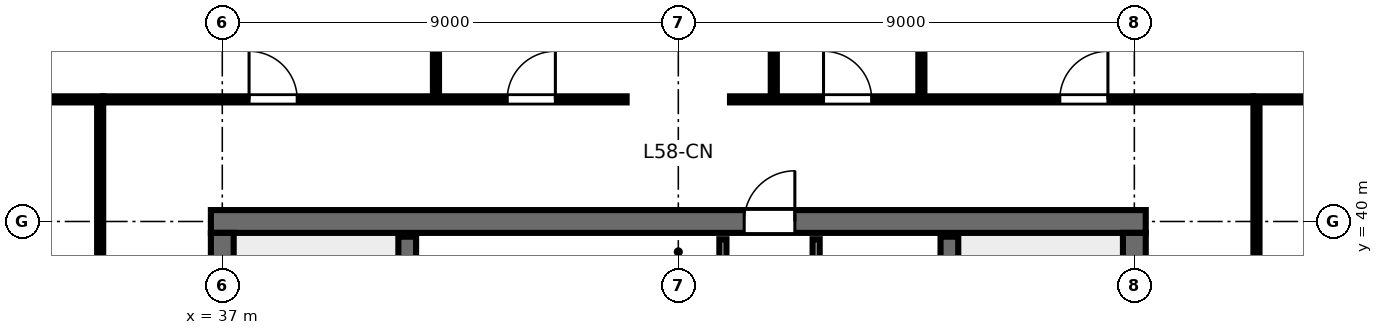
"""IFC4 building model, lengths in metres.
Left out: names, types, materials, properties, quantities, classifications, styles, units other than length and angle.
Written with IfcOpenShell. Run it as: python <this file> out.ifc"""

import sys

from ifc_helpers import new_model, si_unit, direction, frame, frame_2d, origin, place, context, subcontext, project, spatial, rectangle, extrude, element, fill, save


model = new_model("IFC4")
c1 = context("Model", 3, precision=1e-05, world=origin(), true_north=direction((0.0, 1.0)))
c2 = subcontext(c1, "Body", "Model", "MODEL_VIEW")
j1 = project(units=[si_unit("LENGTHUNIT", "METRE"), si_unit("PLANEANGLEUNIT", "RADIAN")], contexts=[c1])
p1 = place(None, origin())
s1 = spatial("IfcSite", under=j1, at=p1, CompositionType="ELEMENT")
p2 = place(p1, origin())
s2 = spatial("IfcBuilding", under=s1, at=p2, CompositionType="ELEMENT")
p3 = place(p2, frame((0.0, 0.0, 220.2)))
s3 = spatial("IfcBuildingStorey", under=s2, at=p3, CompositionType="ELEMENT", Elevation=220.2)
p4 = place(p3, frame((36.775, 40.0, 0.0), z_axis=(0.0, 0.0, 1.0), x_axis=(1.0, 0.0, 0.0)))
e1 = element("IfcWall", 1, at=p4, inside=s3, PredefinedType="SHEAR", context=c2, shape_type="SweptSolid", body=[
    extrude(rectangle(XDim=18.45, YDim=0.45, at=frame_2d((9.225, 0.0))), origin(), (0.0, 0.0, 1.0), 3.36),
])
p5 = place(p4, frame((10.525, 0.0, 0.0)))
e2 = element("IfcOpeningElement", 2, at=p5, cuts=e1, PredefinedType="OPENING", context=c2, shape_type="SweptSolid", body=[
    extrude(rectangle(XDim=1.0, YDim=2.15, at=frame_2d((0.5, 1.075))), frame((0.0, 0.235, 0.0), z_axis=(0.0, -1.0, 0.0), x_axis=(1.0, 0.0, 0.0)), (0.0, 0.0, 1.0), 0.47),
])
p6 = place(p3, frame((37.0, 24.225, 0.0), z_axis=(0.0, 0.0, 1.0), x_axis=(0.0, 1.0, 0.0)))
e3 = element("IfcWall", 3, at=p6, inside=s3, PredefinedType="SHEAR", context=c2, shape_type="SweptSolid", body=[
    extrude(rectangle(XDim=15.55, YDim=0.45, at=frame_2d((7.775, 0.0))), origin(), (0.0, 0.0, 1.0), 3.36),
])
p7 = place(p6, frame((5.3, 0.0, 0.0)))
e4 = element("IfcOpeningElement", 4, at=p7, cuts=e3, PredefinedType="OPENING", context=c2, shape_type="SweptSolid", body=[
    extrude(rectangle(XDim=1.15, YDim=2.15, at=frame_2d((0.575, 1.075))), frame((0.0, 0.235, 0.0), z_axis=(0.0, -1.0, 0.0), x_axis=(1.0, 0.0, 0.0)), (0.0, 0.0, 1.0), 0.47),
])
p8 = place(p3, frame((55.0, 24.225, 0.0), z_axis=(0.0, 0.0, 1.0), x_axis=(0.0, 1.0, 0.0)))
e5 = element("IfcWall", 5, at=p8, inside=s3, PredefinedType="SHEAR", context=c2, shape_type="SweptSolid", body=[
    extrude(rectangle(XDim=15.55, YDim=0.45, at=frame_2d((7.775, 0.0))), origin(), (0.0, 0.0, 1.0), 3.36),
])
p9 = place(p8, frame((5.3, 0.0, 0.0)))
e6 = element("IfcOpeningElement", 6, at=p9, cuts=e5, PredefinedType="OPENING", context=c2, shape_type="SweptSolid", body=[
    extrude(rectangle(XDim=1.15, YDim=2.15, at=frame_2d((0.575, 1.075))), frame((0.0, 0.235, 0.0), z_axis=(0.0, -1.0, 0.0), x_axis=(1.0, 0.0, 0.0)), (0.0, 0.0, 1.0), 0.47),
])
for number, where, z_axis, x_axis in (
    (7, (40.65, 32.0, 0.0), (0.0, 0.0, 1.0), (0.0, 1.0, 0.0)),
    (8, (51.35, 32.0, 0.0), (0.0, 0.0, 1.0), (0.0, 1.0, 0.0)),
):
    element("IfcWall", number, at=place(p3, frame(where, z_axis=z_axis, x_axis=x_axis)), inside=s3, PredefinedType="SHEAR", context=c2, shape_type="SweptSolid", body=[
        extrude(rectangle(XDim=7.7, YDim=0.35, at=frame_2d((3.85, 0.0))), origin(), (0.0, 0.0, 1.0), 3.6),
    ])
p10 = place(p3, frame((46.88, 32.05, 0.0), z_axis=(0.0, 0.0, 1.0), x_axis=(0.0, 1.0, 0.0)))
e9 = element("IfcWall", 9, at=p10, inside=s3, PredefinedType="PARTITIONING", context=c2, shape_type="SweptSolid", body=[
    extrude(rectangle(XDim=7.6, YDim=0.14, at=frame_2d((3.8, 0.0))), origin(), (0.0, 0.0, 1.0), 3.375),
])
p11 = place(p10, frame((3.4, 0.0, 0.0)))
e10 = element("IfcOpeningElement", 10, at=p11, cuts=e9, PredefinedType="OPENING", context=c2, shape_type="SweptSolid", body=[
    extrude(rectangle(XDim=0.95, YDim=2.15, at=frame_2d((0.475, 1.075))), frame((0.0, 0.08, 0.0), z_axis=(0.0, -1.0, 0.0), x_axis=(1.0, 0.0, 0.0)), (0.0, 0.0, 1.0), 0.16),
])
p12 = place(p3, frame((48.72, 32.05, 0.0), z_axis=(0.0, 0.0, 1.0), x_axis=(0.0, 1.0, 0.0)))
e11 = element("IfcWall", 11, at=p12, inside=s3, PredefinedType="PARTITIONING", context=c2, shape_type="SweptSolid", body=[
    extrude(rectangle(XDim=7.6, YDim=0.14, at=frame_2d((3.8, 0.0))), origin(), (0.0, 0.0, 1.0), 3.375),
])
p13 = place(p12, frame((0.8, 0.0, 0.0)))
e12 = element("IfcOpeningElement", 12, at=p13, cuts=e11, PredefinedType="OPENING", context=c2, shape_type="SweptSolid", body=[
    extrude(rectangle(XDim=0.9, YDim=2.15, at=frame_2d((0.45, 1.075))), frame((0.0, 0.08, 0.0), z_axis=(0.0, -1.0, 0.0), x_axis=(1.0, 0.0, 0.0)), (0.0, 0.0, 1.0), 0.16),
])
p14 = place(p12, frame((3.35, 0.0, 0.0)))
e13 = element("IfcOpeningElement", 13, at=p14, cuts=e11, PredefinedType="OPENING", context=c2, shape_type="SweptSolid", body=[
    extrude(rectangle(XDim=0.9, YDim=2.15, at=frame_2d((0.45, 1.075))), frame((0.0, 0.08, 0.0), z_axis=(0.0, -1.0, 0.0), x_axis=(1.0, 0.0, 0.0)), (0.0, 0.0, 1.0), 0.16),
])
p15 = place(p12, frame((5.9, 0.0, 0.0)))
e14 = element("IfcOpeningElement", 14, at=p15, cuts=e11, PredefinedType="OPENING", context=c2, shape_type="SweptSolid", body=[
    extrude(rectangle(XDim=0.92, YDim=2.15, at=frame_2d((0.46, 1.075))), frame((0.0, 0.08, 0.0), z_axis=(0.0, -1.0, 0.0), x_axis=(1.0, 0.0, 0.0)), (0.0, 0.0, 1.0), 0.16),
])
p16 = place(p3, frame((41.217, 42.41, 0.0), z_axis=(0.0, 0.0, 1.0), x_axis=(0.0, 1.0, 0.0)))
e15 = element("IfcWall", 15, at=p16, inside=s3, PredefinedType="PARTITIONING", context=c2, shape_type="SweptSolid", body=[
    extrude(rectangle(XDim=7.137, YDim=0.12, at=frame_2d((3.569, 0.0))), origin(), (0.0, 0.0, 1.0), 2.655),
])
p17 = place(p16, frame((1.4, 0.0, 0.0)))
e16 = element("IfcOpeningElement", 16, at=p17, cuts=e15, PredefinedType="OPENING", context=c2, shape_type="SweptSolid", body=[
    extrude(rectangle(XDim=0.9, YDim=2.15, at=frame_2d((0.45, 1.075))), frame((0.0, 0.07, 0.0), z_axis=(0.0, -1.0, 0.0), x_axis=(1.0, 0.0, 0.0)), (0.0, 0.0, 1.0), 0.14),
])
p18 = place(p3, frame((47.885, 42.41, 0.0), z_axis=(0.0, 0.0, 1.0), x_axis=(0.0, 1.0, 0.0)))
e17 = element("IfcWall", 17, at=p18, inside=s3, PredefinedType="PARTITIONING", context=c2, shape_type="SweptSolid", body=[
    extrude(rectangle(XDim=7.137, YDim=0.12, at=frame_2d((3.569, 0.0))), origin(), (0.0, 0.0, 1.0), 2.655),
])
p19 = place(p18, frame((1.4, 0.0, 0.0)))
e18 = element("IfcOpeningElement", 18, at=p19, cuts=e17, PredefinedType="OPENING", context=c2, shape_type="SweptSolid", body=[
    extrude(rectangle(XDim=0.9, YDim=2.15, at=frame_2d((0.45, 1.075))), frame((0.0, 0.07, 0.0), z_axis=(0.0, -1.0, 0.0), x_axis=(1.0, 0.0, 0.0)), (0.0, 0.0, 1.0), 0.14),
])
p20 = place(p3, frame((50.797, 42.41, 0.0), z_axis=(0.0, 0.0, 1.0), x_axis=(0.0, 1.0, 0.0)))
e19 = element("IfcWall", 19, at=p20, inside=s3, PredefinedType="PARTITIONING", context=c2, shape_type="SweptSolid", body=[
    extrude(rectangle(XDim=7.137, YDim=0.12, at=frame_2d((3.569, 0.0))), origin(), (0.0, 0.0, 1.0), 2.655),
])
p21 = place(p20, frame((1.4, 0.0, 0.0)))
e20 = element("IfcOpeningElement", 20, at=p21, cuts=e19, PredefinedType="OPENING", context=c2, shape_type="SweptSolid", body=[
    extrude(rectangle(XDim=0.9, YDim=2.15, at=frame_2d((0.45, 1.075))), frame((0.0, 0.07, 0.0), z_axis=(0.0, -1.0, 0.0), x_axis=(1.0, 0.0, 0.0)), (0.0, 0.0, 1.0), 0.14),
])
p22 = place(p3, frame((34.65, 42.41, 0.0), z_axis=(0.0, 0.0, 1.0), x_axis=(1.0, 0.0, 0.0)))
e21 = element("IfcWall", 21, at=p22, inside=s3, PredefinedType="PARTITIONING", context=c2, shape_type="SweptSolid", body=[
    extrude(rectangle(XDim=10.33, YDim=0.12, at=frame_2d((5.165, 0.0))), origin(), (0.0, 0.0, 1.0), 2.655),
])
p23 = place(p22, frame((2.878, 0.0, 0.0)))
e22 = element("IfcOpeningElement", 22, at=p23, cuts=e21, PredefinedType="OPENING", context=c2, shape_type="SweptSolid", body=[
    extrude(rectangle(XDim=0.95, YDim=2.15, at=frame_2d((0.475, 1.075))), frame((0.0, 0.07, 0.0), z_axis=(0.0, -1.0, 0.0), x_axis=(1.0, 0.0, 0.0)), (0.0, 0.0, 1.0), 0.14),
])
p24 = place(p22, frame((7.974, 0.0, 0.0)))
e23 = element("IfcOpeningElement", 23, at=p24, cuts=e21, PredefinedType="OPENING", context=c2, shape_type="SweptSolid", body=[
    extrude(rectangle(XDim=0.95, YDim=2.15, at=frame_2d((0.475, 1.075))), frame((0.0, 0.07, 0.0), z_axis=(0.0, -1.0, 0.0), x_axis=(1.0, 0.0, 0.0)), (0.0, 0.0, 1.0), 0.14),
])
p25 = place(p3, frame((47.02, 42.41, 0.0), z_axis=(0.0, 0.0, 1.0), x_axis=(1.0, 0.0, 0.0)))
e24 = element("IfcWall", 24, at=p25, inside=s3, PredefinedType="PARTITIONING", context=c2, shape_type="SweptSolid", body=[
    extrude(rectangle(XDim=10.33, YDim=0.12, at=frame_2d((5.165, 0.0))), origin(), (0.0, 0.0, 1.0), 2.655),
])
p26 = place(p25, frame((1.846, 0.0, 0.0)))
e25 = element("IfcOpeningElement", 25, at=p26, cuts=e24, PredefinedType="OPENING", context=c2, shape_type="SweptSolid", body=[
    extrude(rectangle(XDim=0.95, YDim=2.15, at=frame_2d((0.475, 1.075))), frame((0.0, 0.07, 0.0), z_axis=(0.0, -1.0, 0.0), x_axis=(1.0, 0.0, 0.0)), (0.0, 0.0, 1.0), 0.14),
])
p27 = place(p25, frame((6.509, 0.0, 0.0)))
e26 = element("IfcOpeningElement", 26, at=p27, cuts=e24, PredefinedType="OPENING", context=c2, shape_type="SweptSolid", body=[
    extrude(rectangle(XDim=0.95, YDim=2.15, at=frame_2d((0.475, 1.075))), frame((0.0, 0.07, 0.0), z_axis=(0.0, -1.0, 0.0), x_axis=(1.0, 0.0, 0.0)), (0.0, 0.0, 1.0), 0.14),
])
p28 = place(p3, frame((34.59, 21.65, 0.0), z_axis=(0.0, 0.0, 1.0), x_axis=(0.0, 1.0, 0.0)))
e27 = element("IfcWall", 27, at=p28, inside=s3, PredefinedType="PARTITIONING", context=c2, shape_type="SweptSolid", body=[
    extrude(rectangle(XDim=20.7, YDim=0.12, at=frame_2d((10.35, 0.0))), origin(), (0.0, 0.0, 1.0), 2.655),
])
p29 = place(p28, frame((5.449, 0.0, 0.0)))
e28 = element("IfcOpeningElement", 28, at=p29, cuts=e27, PredefinedType="OPENING", context=c2, shape_type="SweptSolid", body=[
    extrude(rectangle(XDim=0.95, YDim=2.15, at=frame_2d((0.475, 1.075))), frame((0.0, 0.07, 0.0), z_axis=(0.0, -1.0, 0.0), x_axis=(1.0, 0.0, 0.0)), (0.0, 0.0, 1.0), 0.14),
])
p30 = place(p28, frame((15.599, 0.0, 0.0)))
e29 = element("IfcOpeningElement", 29, at=p30, cuts=e27, PredefinedType="OPENING", context=c2, shape_type="SweptSolid", body=[
    extrude(rectangle(XDim=0.95, YDim=2.15, at=frame_2d((0.475, 1.075))), frame((0.0, 0.07, 0.0), z_axis=(0.0, -1.0, 0.0), x_axis=(1.0, 0.0, 0.0)), (0.0, 0.0, 1.0), 0.14),
])
p31 = place(p3, frame((57.41, 21.65, 0.0), z_axis=(0.0, 0.0, 1.0), x_axis=(0.0, 1.0, 0.0)))
e30 = element("IfcWall", 30, at=p31, inside=s3, PredefinedType="PARTITIONING", context=c2, shape_type="SweptSolid", body=[
    extrude(rectangle(XDim=20.7, YDim=0.12, at=frame_2d((10.35, 0.0))), origin(), (0.0, 0.0, 1.0), 2.655),
])
p32 = place(p31, frame((9.875, 0.0, 0.0)))
e31 = element("IfcOpeningElement", 31, at=p32, cuts=e30, PredefinedType="OPENING", context=c2, shape_type="SweptSolid", body=[
    extrude(rectangle(XDim=0.95, YDim=2.15, at=frame_2d((0.475, 1.075))), frame((0.0, 0.07, 0.0), z_axis=(0.0, -1.0, 0.0), x_axis=(1.0, 0.0, 0.0)), (0.0, 0.0, 1.0), 0.14),
])
for number, where, z_axis, x_axis in (
    (32, (34.65, 42.41, 0.0), (0.0, 0.0, 1.0), (-1.0, 0.0, 0.0)),
    (33, (57.35, 42.41, 0.0), (0.0, 0.0, 1.0), (1.0, 0.0, 0.0)),
):
    element("IfcWall", number, at=place(p3, frame(where, z_axis=z_axis, x_axis=x_axis)), inside=s3, PredefinedType="PARTITIONING", context=c2, shape_type="SweptSolid", body=[
        extrude(rectangle(XDim=8.243, YDim=0.12, at=frame_2d((4.121, 0.0))), origin(), (0.0, 0.0, 1.0), 2.655),
    ])
p33 = place(p5, origin())
e34 = element("IfcDoor", 34, at=p33, inside=s3, OperationType="SINGLE_SWING_RIGHT", PredefinedType="DOOR", context=c2, shape_type="SweptSolid", body=[
    extrude(rectangle(XDim=1.0, YDim=2.15, at=frame_2d((0.5, 1.075))), frame((0.0, 0.025, 0.0), z_axis=(0.0, -1.0, 0.0), x_axis=(1.0, 0.0, 0.0)), (0.0, 0.0, 1.0), 0.05),
])
fill(e2, e34)
p34 = place(p23, origin())
e35 = element("IfcDoor", 35, at=p34, inside=s3, OperationType="SINGLE_SWING_LEFT", PredefinedType="DOOR", context=c2, shape_type="SweptSolid", body=[
    extrude(rectangle(XDim=0.95, YDim=2.15, at=frame_2d((0.475, 1.075))), frame((0.0, 0.025, 0.0), z_axis=(0.0, -1.0, 0.0), x_axis=(1.0, 0.0, 0.0)), (0.0, 0.0, 1.0), 0.05),
])
fill(e22, e35)
p35 = place(p24, origin())
e36 = element("IfcDoor", 36, at=p35, inside=s3, OperationType="SINGLE_SWING_RIGHT", PredefinedType="DOOR", context=c2, shape_type="SweptSolid", body=[
    extrude(rectangle(XDim=0.95, YDim=2.15, at=frame_2d((0.475, 1.075))), frame((0.0, 0.025, 0.0), z_axis=(0.0, -1.0, 0.0), x_axis=(1.0, 0.0, 0.0)), (0.0, 0.0, 1.0), 0.05),
])
fill(e23, e36)
p36 = place(p26, origin())
e37 = element("IfcDoor", 37, at=p36, inside=s3, OperationType="SINGLE_SWING_LEFT", PredefinedType="DOOR", context=c2, shape_type="SweptSolid", body=[
    extrude(rectangle(XDim=0.95, YDim=2.15, at=frame_2d((0.475, 1.075))), frame((0.0, 0.025, 0.0), z_axis=(0.0, -1.0, 0.0), x_axis=(1.0, 0.0, 0.0)), (0.0, 0.0, 1.0), 0.05),
])
fill(e25, e37)
p37 = place(p27, origin())
e38 = element("IfcDoor", 38, at=p37, inside=s3, OperationType="SINGLE_SWING_RIGHT", PredefinedType="DOOR", context=c2, shape_type="SweptSolid", body=[
    extrude(rectangle(XDim=0.95, YDim=2.15, at=frame_2d((0.475, 1.075))), frame((0.0, 0.025, 0.0), z_axis=(0.0, -1.0, 0.0), x_axis=(1.0, 0.0, 0.0)), (0.0, 0.0, 1.0), 0.05),
])
fill(e26, e38)
save(model, sys.argv[1])
